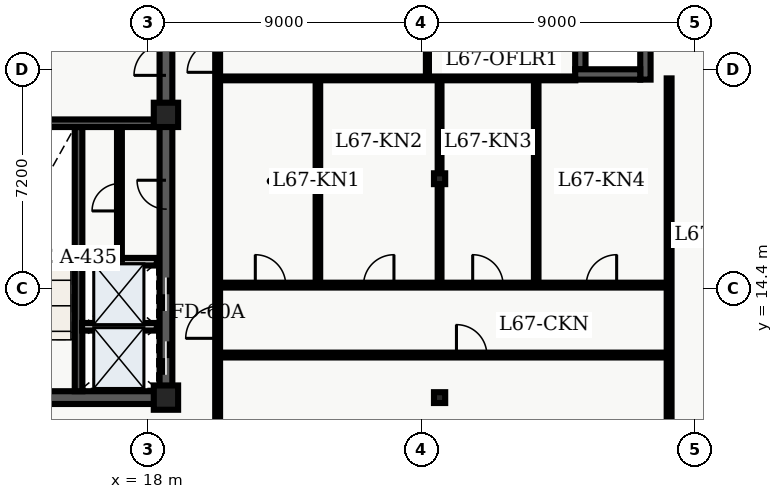
"""IFC4 building model, lengths in metres.
Left out: names, types, materials, properties, quantities, classifications, styles, units other than length and angle.
Written with IfcOpenShell. Run it as: python <this file> out.ifc"""

import sys

from ifc_helpers import new_model, entity, si_unit, converted_unit, direction, frame, origin_with_axes, origin_2d_with_axis, place, context, subcontext, project, spatial, polyline, rectangle, i_section, outline, extrude, element, fill, save


model = new_model("IFC4")
c1 = context("Model", 3, precision=1e-05, world=origin_with_axes(), true_north=direction((0.0, 1.0)))
c2 = subcontext(c1, "Body", "Model", "MODEL_VIEW")
j1 = project(units=[si_unit("LENGTHUNIT", "METRE"), converted_unit("PLANEANGLEUNIT", "DEGREE", entity("IfcPlaneAngleMeasure", 0.017), si_unit("PLANEANGLEUNIT", "RADIAN"), dimensions=[0, 0, 0, 0, 0, 0, 0])], contexts=[c1])
p1 = place(None, origin_with_axes())
s1 = spatial("IfcSite", under=j1, at=p1, CompositionType="ELEMENT")
p2 = place(p1, origin_with_axes())
s2 = spatial("IfcBuilding", under=s1, at=p2, CompositionType="ELEMENT")
p3 = place(p2, frame((0.0, 0.0, 272.4), z_axis=(0.0, 0.0, 1.0), x_axis=(1.0, 0.0, 0.0)))
s3 = spatial("IfcBuildingStorey", under=s2, at=p3, CompositionType="ELEMENT", Elevation=272.4)
p4 = place(p3, frame((11.4, 10.8, 0.0), z_axis=(0.0, 0.0, 1.0), x_axis=(1.0, 0.0, 0.0)))
e1 = element("IfcWall", 1, at=p4, inside=s3, PredefinedType="SHEAR", context=c2, shape_type="SweptSolid", body=[
    extrude(outline(polyline([(0.0, -0.21), (7.2, -0.21), (7.2, 0.21), (0.0, 0.21), (0.0, -0.21)])), origin_with_axes(), (0.0, 0.0, 1.0), 3.66),
])
p5 = place(p4, frame((2.625, 0.0, 0.0), z_axis=(0.0, 0.0, 1.0), x_axis=(1.0, 0.0, 0.0)))
e2 = element("IfcOpeningElement", 2, at=p5, cuts=e1, PredefinedType="OPENING", context=c2, shape_type="SweptSolid", body=[
    extrude(rectangle(XDim=1.05, YDim=0.44, at=origin_2d_with_axis()), origin_with_axes(), (0.0, 0.0, 1.0), 2.15),
])
p6 = place(p3, frame((18.6, 10.8, 0.0), z_axis=(0.0, 0.0, 1.0), x_axis=(0.0, 1.0, 0.0)))
e3 = element("IfcWall", 3, at=p6, inside=s3, PredefinedType="SHEAR", context=c2, shape_type="SweptSolid", body=[
    extrude(outline(polyline([(0.0, -0.21), (13.5, -0.21), (13.5, 0.21), (0.0, 0.21), (0.0, -0.21)])), origin_with_axes(), (0.0, 0.0, 1.0), 3.66),
])
p7 = place(p6, frame((1.3, 0.0, 0.0), z_axis=(0.0, 0.0, 1.0), x_axis=(1.0, 0.0, 0.0)))
e4 = element("IfcOpeningElement", 4, at=p7, cuts=e3, PredefinedType="OPENING", context=c2, shape_type="SweptSolid", body=[
    extrude(rectangle(XDim=1.1, YDim=0.44, at=origin_2d_with_axis()), origin_with_axes(), (0.0, 0.0, 1.0), 2.15),
])
p8 = place(p6, frame((3.4, 0.0, 0.0), z_axis=(0.0, 0.0, 1.0), x_axis=(1.0, 0.0, 0.0)))
e5 = element("IfcOpeningElement", 5, at=p8, cuts=e3, PredefinedType="OPENING", context=c2, shape_type="SweptSolid", body=[
    extrude(rectangle(XDim=1.1, YDim=0.44, at=origin_2d_with_axis()), origin_with_axes(), (0.0, 0.0, 1.0), 2.15),
])
p9 = place(p6, frame((11.125, 0.0, 0.0), z_axis=(0.0, 0.0, 1.0), x_axis=(1.0, 0.0, 0.0)))
e6 = element("IfcOpeningElement", 6, at=p9, cuts=e3, PredefinedType="OPENING", context=c2, shape_type="SweptSolid", body=[
    extrude(rectangle(XDim=1.05, YDim=0.44, at=origin_2d_with_axis()), origin_with_axes(), (0.0, 0.0, 1.0), 2.15),
])
p10 = place(p6, frame((6.675, 0.0, 0.0), z_axis=(0.0, 0.0, 1.0), x_axis=(1.0, 0.0, 0.0)))
e7 = element("IfcOpeningElement", 7, at=p10, cuts=e3, PredefinedType="OPENING", context=c2, shape_type="SweptSolid", body=[
    extrude(rectangle(XDim=0.95, YDim=0.44, at=origin_2d_with_axis()), origin_with_axes(), (0.0, 0.0, 1.0), 2.15),
])
p11 = place(p3, frame((15.725, 11.01, 0.0), z_axis=(0.0, 0.0, 1.0), x_axis=(0.0, 1.0, 0.0)))
e8 = element("IfcWall", 8, at=p11, inside=s3, PredefinedType="SHEAR", context=c2, shape_type="SweptSolid", body=[
    extrude(outline(polyline([(0.0, -0.125), (8.69, -0.125), (8.69, 0.125), (0.0, 0.125), (0.0, -0.125)])), origin_with_axes(), (0.0, 0.0, 1.0), 3.66),
])
p12 = place(p3, frame((11.61, 19.825, 0.0), z_axis=(0.0, 0.0, 1.0), x_axis=(1.0, 0.0, 0.0)))
e9 = element("IfcWall", 9, at=p12, inside=s3, PredefinedType="SHEAR", context=c2, shape_type="SweptSolid", body=[
    extrude(outline(polyline([(0.0, -0.125), (6.78, -0.125), (6.78, 0.125), (0.0, 0.125), (0.0, -0.125)])), origin_with_axes(), (0.0, 0.0, 1.0), 3.66),
])
for number, where, z_axis, x_axis in (
    (10, (18.6, 10.8, 0.0), (0.0, 0.0, 1.0), (1.0, 0.0, 0.0)),
    (11, (18.6, 20.1, 0.0), (0.0, 0.0, 1.0), (1.0, 0.0, 0.0)),
):
    element("IfcColumn", number, at=place(p3, frame(where, z_axis=z_axis, x_axis=x_axis)), inside=s3, PredefinedType="COLUMN", context=c2, shape_type="SweptSolid", body=[
        extrude(rectangle(XDim=0.8, YDim=0.8, at=origin_2d_with_axis()), origin_with_axes(), (0.0, 0.0, 1.0), 3.9),
    ])
for number, where, z_axis, x_axis in (
    (12, (27.6, 10.8, 0.0), (0.0, 0.0, 1.0), (1.0, 0.0, 0.0)),
    (13, (27.6, 18.0, 0.0), (0.0, 0.0, 1.0), (1.0, 0.0, 0.0)),
):
    element("IfcColumn", number, at=place(p3, frame(where, z_axis=z_axis, x_axis=x_axis)), inside=s3, PredefinedType="COLUMN", context=c2, shape_type="SweptSolid", body=[
        extrude(i_section(OverallWidth=0.369, OverallDepth=0.356, WebThickness=0.011, FlangeThickness=0.018, FilletRadius=0.018, at=origin_2d_with_axis()), origin_with_axes(), (0.0, 0.0, 1.0), 3.9),
    ])
for number, where, z_axis, x_axis in (
    (14, (15.84, 13.13, 0.0), (0.0, 0.0, 1.0), (1.0, 0.0, 0.0)),
    (15, (15.84, 15.27, 0.0), (0.0, 0.0, 1.0), (1.0, 0.0, 0.0)),
):
    element("IfcWall", number, at=place(p3, frame(where, z_axis=z_axis, x_axis=x_axis)), inside=s3, PredefinedType="SOLIDWALL", context=c2, shape_type="SweptSolid", body=[
        extrude(outline(polyline([(0.0, -0.125), (2.46, -0.125), (2.46, 0.125), (0.0, 0.125), (0.0, -0.125)])), origin_with_axes(), (0.0, 0.0, 1.0), 2.7),
    ])
p13 = place(p3, frame((17.07, 15.34, 0.0), z_axis=(0.0, 0.0, 1.0), x_axis=(0.0, 1.0, 0.0)))
e16 = element("IfcWall", 16, at=p13, inside=s3, PredefinedType="PARTITIONING", context=c2, shape_type="SweptSolid", body=[
    extrude(outline(polyline([(0.0, -0.08), (4.36, -0.08), (4.36, 0.08), (0.0, 0.08), (0.0, -0.08)])), origin_with_axes(), (0.0, 0.0, 1.0), 2.7),
])
p14 = place(p13, frame((2.05, 0.0, 0.0), z_axis=(0.0, 0.0, 1.0), x_axis=(1.0, 0.0, 0.0)))
e17 = element("IfcOpeningElement", 17, at=p14, cuts=e16, PredefinedType="OPENING", context=c2, shape_type="SweptSolid", body=[
    extrude(rectangle(XDim=0.9, YDim=0.18, at=origin_2d_with_axis()), origin_with_axes(), (0.0, 0.0, 1.0), 2.15),
])
p15 = place(p3, frame((20.3, 7.8, 0.0), z_axis=(0.0, 0.0, 1.0), x_axis=(0.0, 1.0, 0.0)))
e18 = element("IfcWall", 18, at=p15, inside=s3, PredefinedType="PARTITIONING", context=c2, shape_type="SweptSolid", body=[
    extrude(outline(polyline([(0.0, -0.08), (32.7, -0.08), (32.7, 0.08), (0.0, 0.08), (0.0, -0.08)])), origin_with_axes(), (0.0, 0.0, 1.0), 2.7),
])
p16 = place(p15, frame((14.2, 0.0, 0.0), z_axis=(0.0, 0.0, 1.0), x_axis=(1.0, 0.0, 0.0)))
e19 = element("IfcOpeningElement", 19, at=p16, cuts=e18, PredefinedType="OPENING", context=c2, shape_type="SweptSolid", body=[
    extrude(rectangle(XDim=1.0, YDim=0.18, at=origin_2d_with_axis()), origin_with_axes(), (0.0, 0.0, 1.0), 2.15),
])
p17 = place(p15, frame((18.779, 0.0, 0.0), z_axis=(0.0, 0.0, 1.0), x_axis=(1.0, 0.0, 0.0)))
e20 = element("IfcOpeningElement", 20, at=p17, cuts=e18, PredefinedType="OPENING", context=c2, shape_type="SweptSolid", body=[
    extrude(rectangle(XDim=1.0, YDim=0.18, at=origin_2d_with_axis()), origin_with_axes(), (0.0, 0.0, 1.0), 2.15),
])
p18 = place(p15, frame((23.784, 0.0, 0.0), z_axis=(0.0, 0.0, 1.0), x_axis=(1.0, 0.0, 0.0)))
e21 = element("IfcOpeningElement", 21, at=p18, cuts=e18, PredefinedType="OPENING", context=c2, shape_type="SweptSolid", body=[
    extrude(rectangle(XDim=1.0, YDim=0.18, at=origin_2d_with_axis()), origin_with_axes(), (0.0, 0.0, 1.0), 2.15),
])
p19 = place(p15, frame((27.651, 0.0, 0.0), z_axis=(0.0, 0.0, 1.0), x_axis=(1.0, 0.0, 0.0)))
e22 = element("IfcOpeningElement", 22, at=p19, cuts=e18, PredefinedType="OPENING", context=c2, shape_type="SweptSolid", body=[
    extrude(rectangle(XDim=1.0, YDim=0.18, at=origin_2d_with_axis()), origin_with_axes(), (0.0, 0.0, 1.0), 2.15),
])
p20 = place(p15, frame((5.475, 0.0, 0.0), z_axis=(0.0, 0.0, 1.0), x_axis=(1.0, 0.0, 0.0)))
e23 = element("IfcOpeningElement", 23, at=p20, cuts=e18, PredefinedType="OPENING", context=c2, shape_type="SweptSolid", body=[
    extrude(rectangle(XDim=1.05, YDim=0.18, at=origin_2d_with_axis()), origin_with_axes(), (0.0, 0.0, 1.0), 2.15),
])
p21 = place(p3, frame((27.2, 21.4, 0.0), z_axis=(0.0, 0.0, 1.0), x_axis=(0.0, 1.0, 0.0)))
e24 = element("IfcWall", 24, at=p21, inside=s3, PredefinedType="PARTITIONING", context=c2, shape_type="SweptSolid", body=[
    extrude(outline(polyline([(0.0, -0.05), (18.9, -0.05), (18.9, 0.05), (0.0, 0.05), (0.0, -0.05)])), origin_with_axes(), (0.0, 0.0, 1.0), 2.7),
])
p22 = place(p21, frame((1.79, 0.0, 0.0), z_axis=(0.0, 0.0, 1.0), x_axis=(1.0, 0.0, 0.0)))
e25 = element("IfcOpeningElement", 25, at=p22, cuts=e24, PredefinedType="OPENING", context=c2, shape_type="SweptSolid", body=[
    extrude(rectangle(XDim=0.95, YDim=0.12, at=origin_2d_with_axis()), origin_with_axes(), (0.0, 0.0, 1.0), 2.15),
])
p23 = place(p21, frame((5.739, 0.0, 0.0), z_axis=(0.0, 0.0, 1.0), x_axis=(1.0, 0.0, 0.0)))
e26 = element("IfcOpeningElement", 26, at=p23, cuts=e24, PredefinedType="OPENING", context=c2, shape_type="SweptSolid", body=[
    extrude(rectangle(XDim=0.95, YDim=0.12, at=origin_2d_with_axis()), origin_with_axes(), (0.0, 0.0, 1.0), 2.15),
])
p24 = place(p21, frame((10.184, 0.0, 0.0), z_axis=(0.0, 0.0, 1.0), x_axis=(1.0, 0.0, 0.0)))
e27 = element("IfcOpeningElement", 27, at=p24, cuts=e24, PredefinedType="OPENING", context=c2, shape_type="SweptSolid", body=[
    extrude(rectangle(XDim=0.95, YDim=0.12, at=origin_2d_with_axis()), origin_with_axes(), (0.0, 0.0, 1.0), 2.15),
])
p25 = place(p21, frame((14.052, 0.0, 0.0), z_axis=(0.0, 0.0, 1.0), x_axis=(1.0, 0.0, 0.0)))
e28 = element("IfcOpeningElement", 28, at=p25, cuts=e24, PredefinedType="OPENING", context=c2, shape_type="SweptSolid", body=[
    extrude(rectangle(XDim=0.95, YDim=0.12, at=origin_2d_with_axis()), origin_with_axes(), (0.0, 0.0, 1.0), 2.15),
])
p26 = place(p21, frame((17.267, 0.0, 0.0), z_axis=(0.0, 0.0, 1.0), x_axis=(1.0, 0.0, 0.0)))
e29 = element("IfcOpeningElement", 29, at=p26, cuts=e24, PredefinedType="OPENING", context=c2, shape_type="SweptSolid", body=[
    extrude(rectangle(XDim=0.95, YDim=0.12, at=origin_2d_with_axis()), origin_with_axes(), (0.0, 0.0, 1.0), 2.15),
])
p27 = place(p3, frame((20.3, 12.2, 0.0), z_axis=(0.0, 0.0, 1.0), x_axis=(1.0, 0.0, 0.0)))
e30 = element("IfcWall", 30, at=p27, inside=s3, PredefinedType="PARTITIONING", context=c2, shape_type="SweptSolid", body=[
    extrude(outline(polyline([(0.0, -0.08), (14.85, -0.08), (14.85, 0.08), (0.0, 0.08), (0.0, -0.08)])), origin_with_axes(), (0.0, 0.0, 1.0), 2.7),
])
p28 = place(p27, frame((8.355, 0.0, 0.0), z_axis=(0.0, 0.0, 1.0), x_axis=(1.0, 0.0, 0.0)))
e31 = element("IfcOpeningElement", 31, at=p28, cuts=e30, PredefinedType="OPENING", context=c2, shape_type="SweptSolid", body=[
    extrude(rectangle(XDim=1.0, YDim=0.18, at=origin_2d_with_axis()), origin_with_axes(), (0.0, 0.0, 1.0), 2.15),
])
p29 = place(p3, frame((20.3, 14.5, 0.0), z_axis=(0.0, 0.0, 1.0), x_axis=(1.0, 0.0, 0.0)))
e32 = element("IfcWall", 32, at=p29, inside=s3, PredefinedType="PARTITIONING", context=c2, shape_type="SweptSolid", body=[
    extrude(outline(polyline([(0.0, -0.08), (14.85, -0.08), (14.85, 0.08), (0.0, 0.08), (0.0, -0.08)])), origin_with_axes(), (0.0, 0.0, 1.0), 2.7),
])
p30 = place(p29, frame((1.739, 0.0, 0.0), z_axis=(0.0, 0.0, 1.0), x_axis=(1.0, 0.0, 0.0)))
e33 = element("IfcOpeningElement", 33, at=p30, cuts=e32, PredefinedType="OPENING", context=c2, shape_type="SweptSolid", body=[
    extrude(rectangle(XDim=1.0, YDim=0.18, at=origin_2d_with_axis()), origin_with_axes(), (0.0, 0.0, 1.0), 2.15),
])
p31 = place(p29, frame((5.299, 0.0, 0.0), z_axis=(0.0, 0.0, 1.0), x_axis=(1.0, 0.0, 0.0)))
e34 = element("IfcOpeningElement", 34, at=p31, cuts=e32, PredefinedType="OPENING", context=c2, shape_type="SweptSolid", body=[
    extrude(rectangle(XDim=1.0, YDim=0.18, at=origin_2d_with_axis()), origin_with_axes(), (0.0, 0.0, 1.0), 2.15),
])
p32 = place(p29, frame((8.889, 0.0, 0.0), z_axis=(0.0, 0.0, 1.0), x_axis=(1.0, 0.0, 0.0)))
e35 = element("IfcOpeningElement", 35, at=p32, cuts=e32, PredefinedType="OPENING", context=c2, shape_type="SweptSolid", body=[
    extrude(rectangle(XDim=1.0, YDim=0.18, at=origin_2d_with_axis()), origin_with_axes(), (0.0, 0.0, 1.0), 2.15),
])
p33 = place(p29, frame((12.624, 0.0, 0.0), z_axis=(0.0, 0.0, 1.0), x_axis=(1.0, 0.0, 0.0)))
e36 = element("IfcOpeningElement", 36, at=p33, cuts=e32, PredefinedType="OPENING", context=c2, shape_type="SweptSolid", body=[
    extrude(rectangle(XDim=1.0, YDim=0.18, at=origin_2d_with_axis()), origin_with_axes(), (0.0, 0.0, 1.0), 2.15),
])
p34 = place(p3, frame((35.15, 4.35, 0.0), z_axis=(0.0, 0.0, 1.0), x_axis=(0.0, 1.0, 0.0)))
e37 = element("IfcWall", 37, at=p34, inside=s3, PredefinedType="PARTITIONING", context=c2, shape_type="SweptSolid", body=[
    extrude(outline(polyline([(0.0, -0.08), (16.95, -0.08), (16.95, 0.08), (0.0, 0.08), (0.0, -0.08)])), origin_with_axes(), (0.0, 0.0, 1.0), 2.7),
])
p35 = place(p3, frame((23.598, 14.62, 0.0), z_axis=(0.0, 0.0, 1.0), x_axis=(0.0, 1.0, 0.0)))
e38 = element("IfcWall", 38, at=p35, inside=s3, PredefinedType="PARTITIONING", context=c2, shape_type="SweptSolid", body=[
    extrude(outline(polyline([(0.0, -0.075), (6.6, -0.075), (6.6, 0.075), (0.0, 0.075), (0.0, -0.075)])), origin_with_axes(), (0.0, 0.0, 1.0), 2.7),
])
p36 = place(p3, frame((27.6, 14.62, 0.0), z_axis=(0.0, 0.0, 1.0), x_axis=(0.0, 1.0, 0.0)))
e39 = element("IfcWall", 39, at=p36, inside=s3, PredefinedType="PARTITIONING", context=c2, shape_type="SweptSolid", body=[
    extrude(outline(polyline([(0.0, -0.062), (6.6, -0.062), (6.6, 0.062), (0.0, 0.062), (0.0, -0.062)])), origin_with_axes(), (0.0, 0.0, 1.0), 2.7),
])
p37 = place(p3, frame((30.778, 14.62, 0.0), z_axis=(0.0, 0.0, 1.0), x_axis=(0.0, 1.0, 0.0)))
e40 = element("IfcWall", 40, at=p37, inside=s3, PredefinedType="PARTITIONING", context=c2, shape_type="SweptSolid", body=[
    extrude(outline(polyline([(0.0, -0.075), (6.6, -0.075), (6.6, 0.075), (0.0, 0.075), (0.0, -0.075)])), origin_with_axes(), (0.0, 0.0, 1.0), 2.7),
])
p38 = place(p3, frame((20.3, 21.3, 0.0), z_axis=(0.0, 0.0, 1.0), x_axis=(1.0, 0.0, 0.0)))
e41 = element("IfcWall", 41, at=p38, inside=s3, PredefinedType="PARTITIONING", context=c2, shape_type="SweptSolid", body=[
    extrude(outline(polyline([(0.0, -0.062), (11.765, -0.062), (11.765, 0.062), (0.0, 0.062), (0.0, -0.062)])), origin_with_axes(), (0.0, 0.0, 1.0), 2.7),
])
p39 = place(p3, frame((34.37, 21.26, 0.0), z_axis=(0.0, 0.0, 1.0), x_axis=(0.0, 1.0, 0.0)))
e42 = element("IfcWall", 42, at=p39, inside=s3, PredefinedType="SOLIDWALL", context=c2, shape_type="SweptSolid", body=[
    extrude(outline(polyline([(0.0, -0.17), (7.54, -0.17), (7.54, 0.17), (0.0, 0.17), (0.0, -0.17)])), origin_with_axes(), (0.0, 0.0, 1.0), 3.66),
])
p40 = place(p39, frame((3.77, 0.0, 0.45), z_axis=(0.0, 0.0, 1.0), x_axis=(1.0, 0.0, 0.0)))
e43 = element("IfcOpeningElement", 43, at=p40, cuts=e42, PredefinedType="OPENING", context=c2, shape_type="SweptSolid", body=[
    extrude(rectangle(XDim=1.5, YDim=0.36, at=origin_2d_with_axis()), origin_with_axes(), (0.0, 0.0, 1.0), 2.1),
])
p41 = place(p3, frame((32.23, 41.82, 0.0), z_axis=(0.0, 0.0, 1.0), x_axis=(0.0, -1.0, 0.0)))
e44 = element("IfcWall", 44, at=p41, inside=s3, PredefinedType="SOLIDWALL", context=c2, shape_type="SweptSolid", body=[
    extrude(outline(polyline([(0.0, -0.17), (20.22, -0.17), (20.22, 0.17), (0.0, 0.17), (0.0, -0.17)])), origin_with_axes(), (0.0, 0.0, 1.0), 3.66),
])
p42 = place(p41, frame((2.978, 0.0, 0.45), z_axis=(0.0, 0.0, 1.0), x_axis=(1.0, 0.0, 0.0)))
e45 = element("IfcOpeningElement", 45, at=p42, cuts=e44, PredefinedType="OPENING", context=c2, shape_type="SweptSolid", body=[
    extrude(rectangle(XDim=1.5, YDim=0.36, at=origin_2d_with_axis()), origin_with_axes(), (0.0, 0.0, 1.0), 2.1),
])
p43 = place(p41, frame((18.092, 0.0, 0.45), z_axis=(0.0, 0.0, 1.0), x_axis=(1.0, 0.0, 0.0)))
e46 = element("IfcOpeningElement", 46, at=p43, cuts=e44, PredefinedType="OPENING", context=c2, shape_type="SweptSolid", body=[
    extrude(rectangle(XDim=1.5, YDim=0.36, at=origin_2d_with_axis()), origin_with_axes(), (0.0, 0.0, 1.0), 2.1),
])
p44 = place(p3, frame((32.06, 21.43, 0.0), z_axis=(0.0, 0.0, 1.0), x_axis=(1.0, 0.0, 0.0)))
e47 = element("IfcWall", 47, at=p44, inside=s3, PredefinedType="SOLIDWALL", context=c2, shape_type="SweptSolid", body=[
    extrude(outline(polyline([(0.0, -0.17), (2.14, -0.17), (2.14, 0.17), (0.0, 0.17), (0.0, -0.17)])), origin_with_axes(), (0.0, 0.0, 1.0), 3.66),
])
p45 = place(p6, frame((1.3, 0.0, 0.0), z_axis=(0.0, 0.0, 1.0), x_axis=(1.0, 0.0, 0.0)))
e48 = element("IfcDoor", 48, at=p45, inside=s3, OperationType="SLIDING_TO_LEFT", PredefinedType="DOOR", context=c2, shape_type="SweptSolid", body=[
    extrude(rectangle(XDim=1.1, YDim=0.09, at=origin_2d_with_axis()), origin_with_axes(), (0.0, 0.0, 1.0), 2.15),
])
fill(e4, e48)
p46 = place(p6, frame((3.4, 0.0, 0.0), z_axis=(0.0, 0.0, 1.0), x_axis=(1.0, 0.0, 0.0)))
e49 = element("IfcDoor", 49, at=p46, inside=s3, OperationType="SLIDING_TO_RIGHT", PredefinedType="DOOR", context=c2, shape_type="SweptSolid", body=[
    extrude(rectangle(XDim=1.1, YDim=0.09, at=origin_2d_with_axis()), origin_with_axes(), (0.0, 0.0, 1.0), 2.15),
])
fill(e5, e49)
p47 = place(p6, frame((11.125, 0.0, 0.0), z_axis=(0.0, 0.0, 1.0), x_axis=(1.0, 0.0, 0.0)))
e50 = element("IfcDoor", 50, at=p47, inside=s3, OperationType="SINGLE_SWING_LEFT", PredefinedType="DOOR", context=c2, shape_type="SweptSolid", body=[
    extrude(rectangle(XDim=1.05, YDim=0.09, at=origin_2d_with_axis()), origin_with_axes(), (0.0, 0.0, 1.0), 2.15),
])
fill(e6, e50)
p48 = place(p13, frame((2.05, 0.0, 0.0), z_axis=(0.0, 0.0, 1.0), x_axis=(1.0, 0.0, 0.0)))
e51 = element("IfcDoor", 51, at=p48, inside=s3, OperationType="SINGLE_SWING_LEFT", PredefinedType="DOOR", context=c2, shape_type="SweptSolid", body=[
    extrude(rectangle(XDim=0.9, YDim=0.09, at=origin_2d_with_axis()), origin_with_axes(), (0.0, 0.0, 1.0), 2.15),
])
fill(e17, e51)
p49 = place(p6, frame((6.675, 0.0, 0.0), z_axis=(0.0, 0.0, 1.0), x_axis=(1.0, 0.0, 0.0)))
e52 = element("IfcDoor", 52, at=p49, inside=s3, OperationType="SINGLE_SWING_RIGHT", PredefinedType="DOOR", context=c2, shape_type="SweptSolid", body=[
    extrude(rectangle(XDim=0.95, YDim=0.09, at=origin_2d_with_axis()), origin_with_axes(), (0.0, 0.0, 1.0), 2.15),
])
fill(e7, e52)
p50 = place(p15, frame((14.2, 0.0, 0.0), z_axis=(0.0, 0.0, 1.0), x_axis=(1.0, 0.0, 0.0)))
e53 = element("IfcDoor", 53, at=p50, inside=s3, OperationType="SINGLE_SWING_LEFT", PredefinedType="DOOR", context=c2, shape_type="SweptSolid", body=[
    extrude(rectangle(XDim=1.0, YDim=0.09, at=origin_2d_with_axis()), origin_with_axes(), (0.0, 0.0, 1.0), 2.15),
])
fill(e19, e53)
p51 = place(p15, frame((5.475, 0.0, 0.0), z_axis=(0.0, 0.0, 1.0), x_axis=(1.0, 0.0, 0.0)))
e54 = element("IfcDoor", 54, at=p51, inside=s3, OperationType="SINGLE_SWING_LEFT", PredefinedType="DOOR", context=c2, shape_type="SweptSolid", body=[
    extrude(rectangle(XDim=1.05, YDim=0.09, at=origin_2d_with_axis()), origin_with_axes(), (0.0, 0.0, 1.0), 2.15),
])
fill(e23, e54)
p52 = place(p27, frame((8.355, 0.0, 0.0), z_axis=(0.0, 0.0, 1.0), x_axis=(1.0, 0.0, 0.0)))
e55 = element("IfcDoor", 55, at=p52, inside=s3, OperationType="SINGLE_SWING_LEFT", PredefinedType="DOOR", context=c2, shape_type="SweptSolid", body=[
    extrude(rectangle(XDim=1.0, YDim=0.09, at=origin_2d_with_axis()), origin_with_axes(), (0.0, 0.0, 1.0), 2.15),
])
fill(e31, e55)
p53 = place(p29, frame((1.739, 0.0, 0.0), z_axis=(0.0, 0.0, 1.0), x_axis=(1.0, 0.0, 0.0)))
e56 = element("IfcDoor", 56, at=p53, inside=s3, OperationType="SINGLE_SWING_LEFT", PredefinedType="DOOR", context=c2, shape_type="SweptSolid", body=[
    extrude(rectangle(XDim=1.0, YDim=0.09, at=origin_2d_with_axis()), origin_with_axes(), (0.0, 0.0, 1.0), 2.15),
])
fill(e33, e56)
p54 = place(p29, frame((5.299, 0.0, 0.0), z_axis=(0.0, 0.0, 1.0), x_axis=(1.0, 0.0, 0.0)))
e57 = element("IfcDoor", 57, at=p54, inside=s3, OperationType="SINGLE_SWING_RIGHT", PredefinedType="DOOR", context=c2, shape_type="SweptSolid", body=[
    extrude(rectangle(XDim=1.0, YDim=0.09, at=origin_2d_with_axis()), origin_with_axes(), (0.0, 0.0, 1.0), 2.15),
])
fill(e34, e57)
p55 = place(p29, frame((8.889, 0.0, 0.0), z_axis=(0.0, 0.0, 1.0), x_axis=(1.0, 0.0, 0.0)))
e58 = element("IfcDoor", 58, at=p55, inside=s3, OperationType="SINGLE_SWING_LEFT", PredefinedType="DOOR", context=c2, shape_type="SweptSolid", body=[
    extrude(rectangle(XDim=1.0, YDim=0.09, at=origin_2d_with_axis()), origin_with_axes(), (0.0, 0.0, 1.0), 2.15),
])
fill(e35, e58)
p56 = place(p29, frame((12.624, 0.0, 0.0), z_axis=(0.0, 0.0, 1.0), x_axis=(1.0, 0.0, 0.0)))
e59 = element("IfcDoor", 59, at=p56, inside=s3, OperationType="SINGLE_SWING_RIGHT", PredefinedType="DOOR", context=c2, shape_type="SweptSolid", body=[
    extrude(rectangle(XDim=1.0, YDim=0.09, at=origin_2d_with_axis()), origin_with_axes(), (0.0, 0.0, 1.0), 2.15),
])
fill(e36, e59)
save(model, sys.argv[1])
